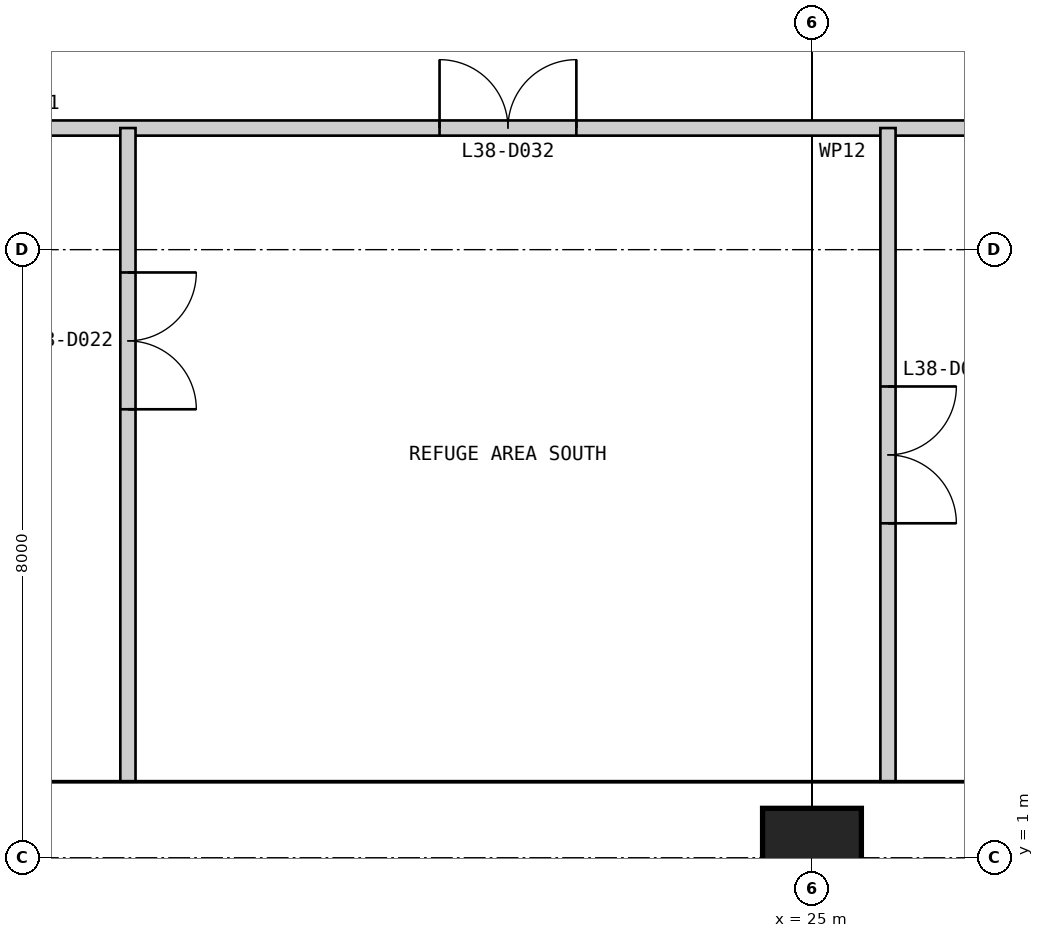
"""IFC4 building model, lengths in metres.
Left out: names, types, materials, properties, quantities, classifications, styles, units other than length and angle.
Written with IfcOpenShell. Run it as: python <this file> out.ifc"""

import sys

from ifc_helpers import new_model, si_unit, direction, frame, frame_2d, origin, origin_2d, place, context, subcontext, project, spatial, rectangle, extrude, element, fill, save


model = new_model("IFC4")
c1 = context("Model", 3, precision=1e-05, world=origin(), true_north=direction((0.0, 1.0)))
c2 = subcontext(c1, "Body", "Model", "MODEL_VIEW")
j1 = project(units=[si_unit("LENGTHUNIT", "METRE"), si_unit("PLANEANGLEUNIT", "RADIAN")], contexts=[c1])
p1 = place(None, origin())
s1 = spatial("IfcSite", under=j1, at=p1, CompositionType="ELEMENT")
p2 = place(p1, origin())
s2 = spatial("IfcBuilding", under=s1, at=p2, CompositionType="ELEMENT")
p3 = place(p2, frame((0.0, 0.0, 162.4)))
s3 = spatial("IfcBuildingStorey", under=s2, at=p3, CompositionType="ELEMENT", Elevation=162.4)
p4 = place(p3, frame((25.0, 1.0, 0.0), z_axis=(0.0, 0.0, 1.0), x_axis=(1.0, 0.0, 0.0)))
e1 = element("IfcColumn", 1, at=p4, inside=s3, PredefinedType="COLUMN", context=c2, shape_type="SweptSolid", body=[
    extrude(rectangle(XDim=1.3, YDim=1.3, at=origin_2d()), origin(), (0.0, 0.0, 1.0), 6.0),
])
p5 = place(p3, frame((13.0, 10.6, 0.0), z_axis=(0.0, 0.0, 1.0), x_axis=(1.0, 0.0, 0.0)))
e2 = element("IfcWall", 2, at=p5, inside=s3, PredefinedType="PARTITIONING", context=c2, shape_type="SweptSolid", body=[
    extrude(rectangle(XDim=24.0, YDim=0.2, at=frame_2d((12.0, 0.0))), origin(), (0.0, 0.0, 1.0), 5.8),
])
p6 = place(p5, frame((1.05, 0.0, 0.0)))
e3 = element("IfcOpeningElement", 3, at=p6, cuts=e2, PredefinedType="OPENING", context=c2, shape_type="SweptSolid", body=[
    extrude(rectangle(XDim=0.9, YDim=2.2, at=frame_2d((0.45, 1.1))), frame((0.0, 0.11, 0.0), z_axis=(0.0, -1.0, 0.0), x_axis=(1.0, 0.0, 0.0)), (0.0, 0.0, 1.0), 0.22),
])
p7 = place(p5, frame((7.1, 0.0, 0.0)))
e4 = element("IfcOpeningElement", 4, at=p7, cuts=e2, PredefinedType="OPENING", context=c2, shape_type="SweptSolid", body=[
    extrude(rectangle(XDim=1.8, YDim=2.4, at=frame_2d((0.9, 1.2))), frame((0.0, 0.11, 0.0), z_axis=(0.0, -1.0, 0.0), x_axis=(1.0, 0.0, 0.0)), (0.0, 0.0, 1.0), 0.22),
])
p8 = place(p5, frame((15.6, 0.0, 0.0)))
e5 = element("IfcOpeningElement", 5, at=p8, cuts=e2, PredefinedType="OPENING", context=c2, shape_type="SweptSolid", body=[
    extrude(rectangle(XDim=1.8, YDim=2.4, at=frame_2d((0.9, 1.2))), frame((0.0, 0.11, 0.0), z_axis=(0.0, -1.0, 0.0), x_axis=(1.0, 0.0, 0.0)), (0.0, 0.0, 1.0), 0.22),
])
p9 = place(p5, frame((21.1, 0.0, 0.0)))
e6 = element("IfcOpeningElement", 6, at=p9, cuts=e2, PredefinedType="OPENING", context=c2, shape_type="SweptSolid", body=[
    extrude(rectangle(XDim=1.8, YDim=2.4, at=frame_2d((0.9, 1.2))), frame((0.0, 0.11, 0.0), z_axis=(0.0, -1.0, 0.0), x_axis=(1.0, 0.0, 0.0)), (0.0, 0.0, 1.0), 0.22),
])
p10 = place(p3, frame((16.0, 2.0, 0.0), z_axis=(0.0, 0.0, 1.0), x_axis=(0.0, 1.0, 0.0)))
e7 = element("IfcWall", 7, at=p10, inside=s3, PredefinedType="PARTITIONING", context=c2, shape_type="SweptSolid", body=[
    extrude(rectangle(XDim=8.6, YDim=0.2, at=frame_2d((4.3, 0.0))), origin(), (0.0, 0.0, 1.0), 4.954),
])
p11 = place(p10, frame((4.9, 0.0, 0.0)))
e8 = element("IfcOpeningElement", 8, at=p11, cuts=e7, PredefinedType="OPENING", context=c2, shape_type="SweptSolid", body=[
    extrude(rectangle(XDim=1.8, YDim=2.4, at=frame_2d((0.9, 1.2))), frame((0.0, 0.11, 0.0), z_axis=(0.0, -1.0, 0.0), x_axis=(1.0, 0.0, 0.0)), (0.0, 0.0, 1.0), 0.22),
])
p12 = place(p3, frame((26.0, 2.0, 0.0), z_axis=(0.0, 0.0, 1.0), x_axis=(0.0, 1.0, 0.0)))
e9 = element("IfcWall", 9, at=p12, inside=s3, PredefinedType="PARTITIONING", context=c2, shape_type="SweptSolid", body=[
    extrude(rectangle(XDim=8.6, YDim=0.2, at=frame_2d((4.3, 0.0))), origin(), (0.0, 0.0, 1.0), 5.8),
])
p13 = place(p12, frame((3.4, 0.0, 0.0)))
e10 = element("IfcOpeningElement", 10, at=p13, cuts=e9, PredefinedType="OPENING", context=c2, shape_type="SweptSolid", body=[
    extrude(rectangle(XDim=1.8, YDim=2.4, at=frame_2d((0.9, 1.2))), frame((0.0, 0.11, 0.0), z_axis=(0.0, -1.0, 0.0), x_axis=(1.0, 0.0, 0.0)), (0.0, 0.0, 1.0), 0.22),
])
p14 = place(p11, frame((1.8, 0.0, 0.0), z_axis=(0.0, 0.0, 1.0), x_axis=(-1.0, 0.0, 0.0)))
e11 = element("IfcDoor", 11, at=p14, inside=s3, OperationType="DOUBLE_DOOR_SINGLE_SWING", PredefinedType="DOOR", context=c2, shape_type="SweptSolid", body=[
    extrude(rectangle(XDim=1.8, YDim=2.4, at=frame_2d((0.9, 1.2))), frame((0.0, 0.025, 0.0), z_axis=(0.0, -1.0, 0.0), x_axis=(1.0, 0.0, 0.0)), (0.0, 0.0, 1.0), 0.05),
])
fill(e8, e11)
p15 = place(p13, frame((1.8, 0.0, 0.0), z_axis=(0.0, 0.0, 1.0), x_axis=(-1.0, 0.0, 0.0)))
e12 = element("IfcDoor", 12, at=p15, inside=s3, OperationType="DOUBLE_DOOR_SINGLE_SWING", PredefinedType="DOOR", context=c2, shape_type="SweptSolid", body=[
    extrude(rectangle(XDim=1.8, YDim=2.4, at=frame_2d((0.9, 1.2))), frame((0.0, 0.025, 0.0), z_axis=(0.0, -1.0, 0.0), x_axis=(1.0, 0.0, 0.0)), (0.0, 0.0, 1.0), 0.05),
])
fill(e10, e12)
p16 = place(p7, origin())
e13 = element("IfcDoor", 13, at=p16, inside=s3, OperationType="DOUBLE_DOOR_SINGLE_SWING", PredefinedType="DOOR", context=c2, shape_type="SweptSolid", body=[
    extrude(rectangle(XDim=1.8, YDim=2.4, at=frame_2d((0.9, 1.2))), frame((0.0, 0.025, 0.0), z_axis=(0.0, -1.0, 0.0), x_axis=(1.0, 0.0, 0.0)), (0.0, 0.0, 1.0), 0.05),
])
fill(e4, e13)
save(model, sys.argv[1])
